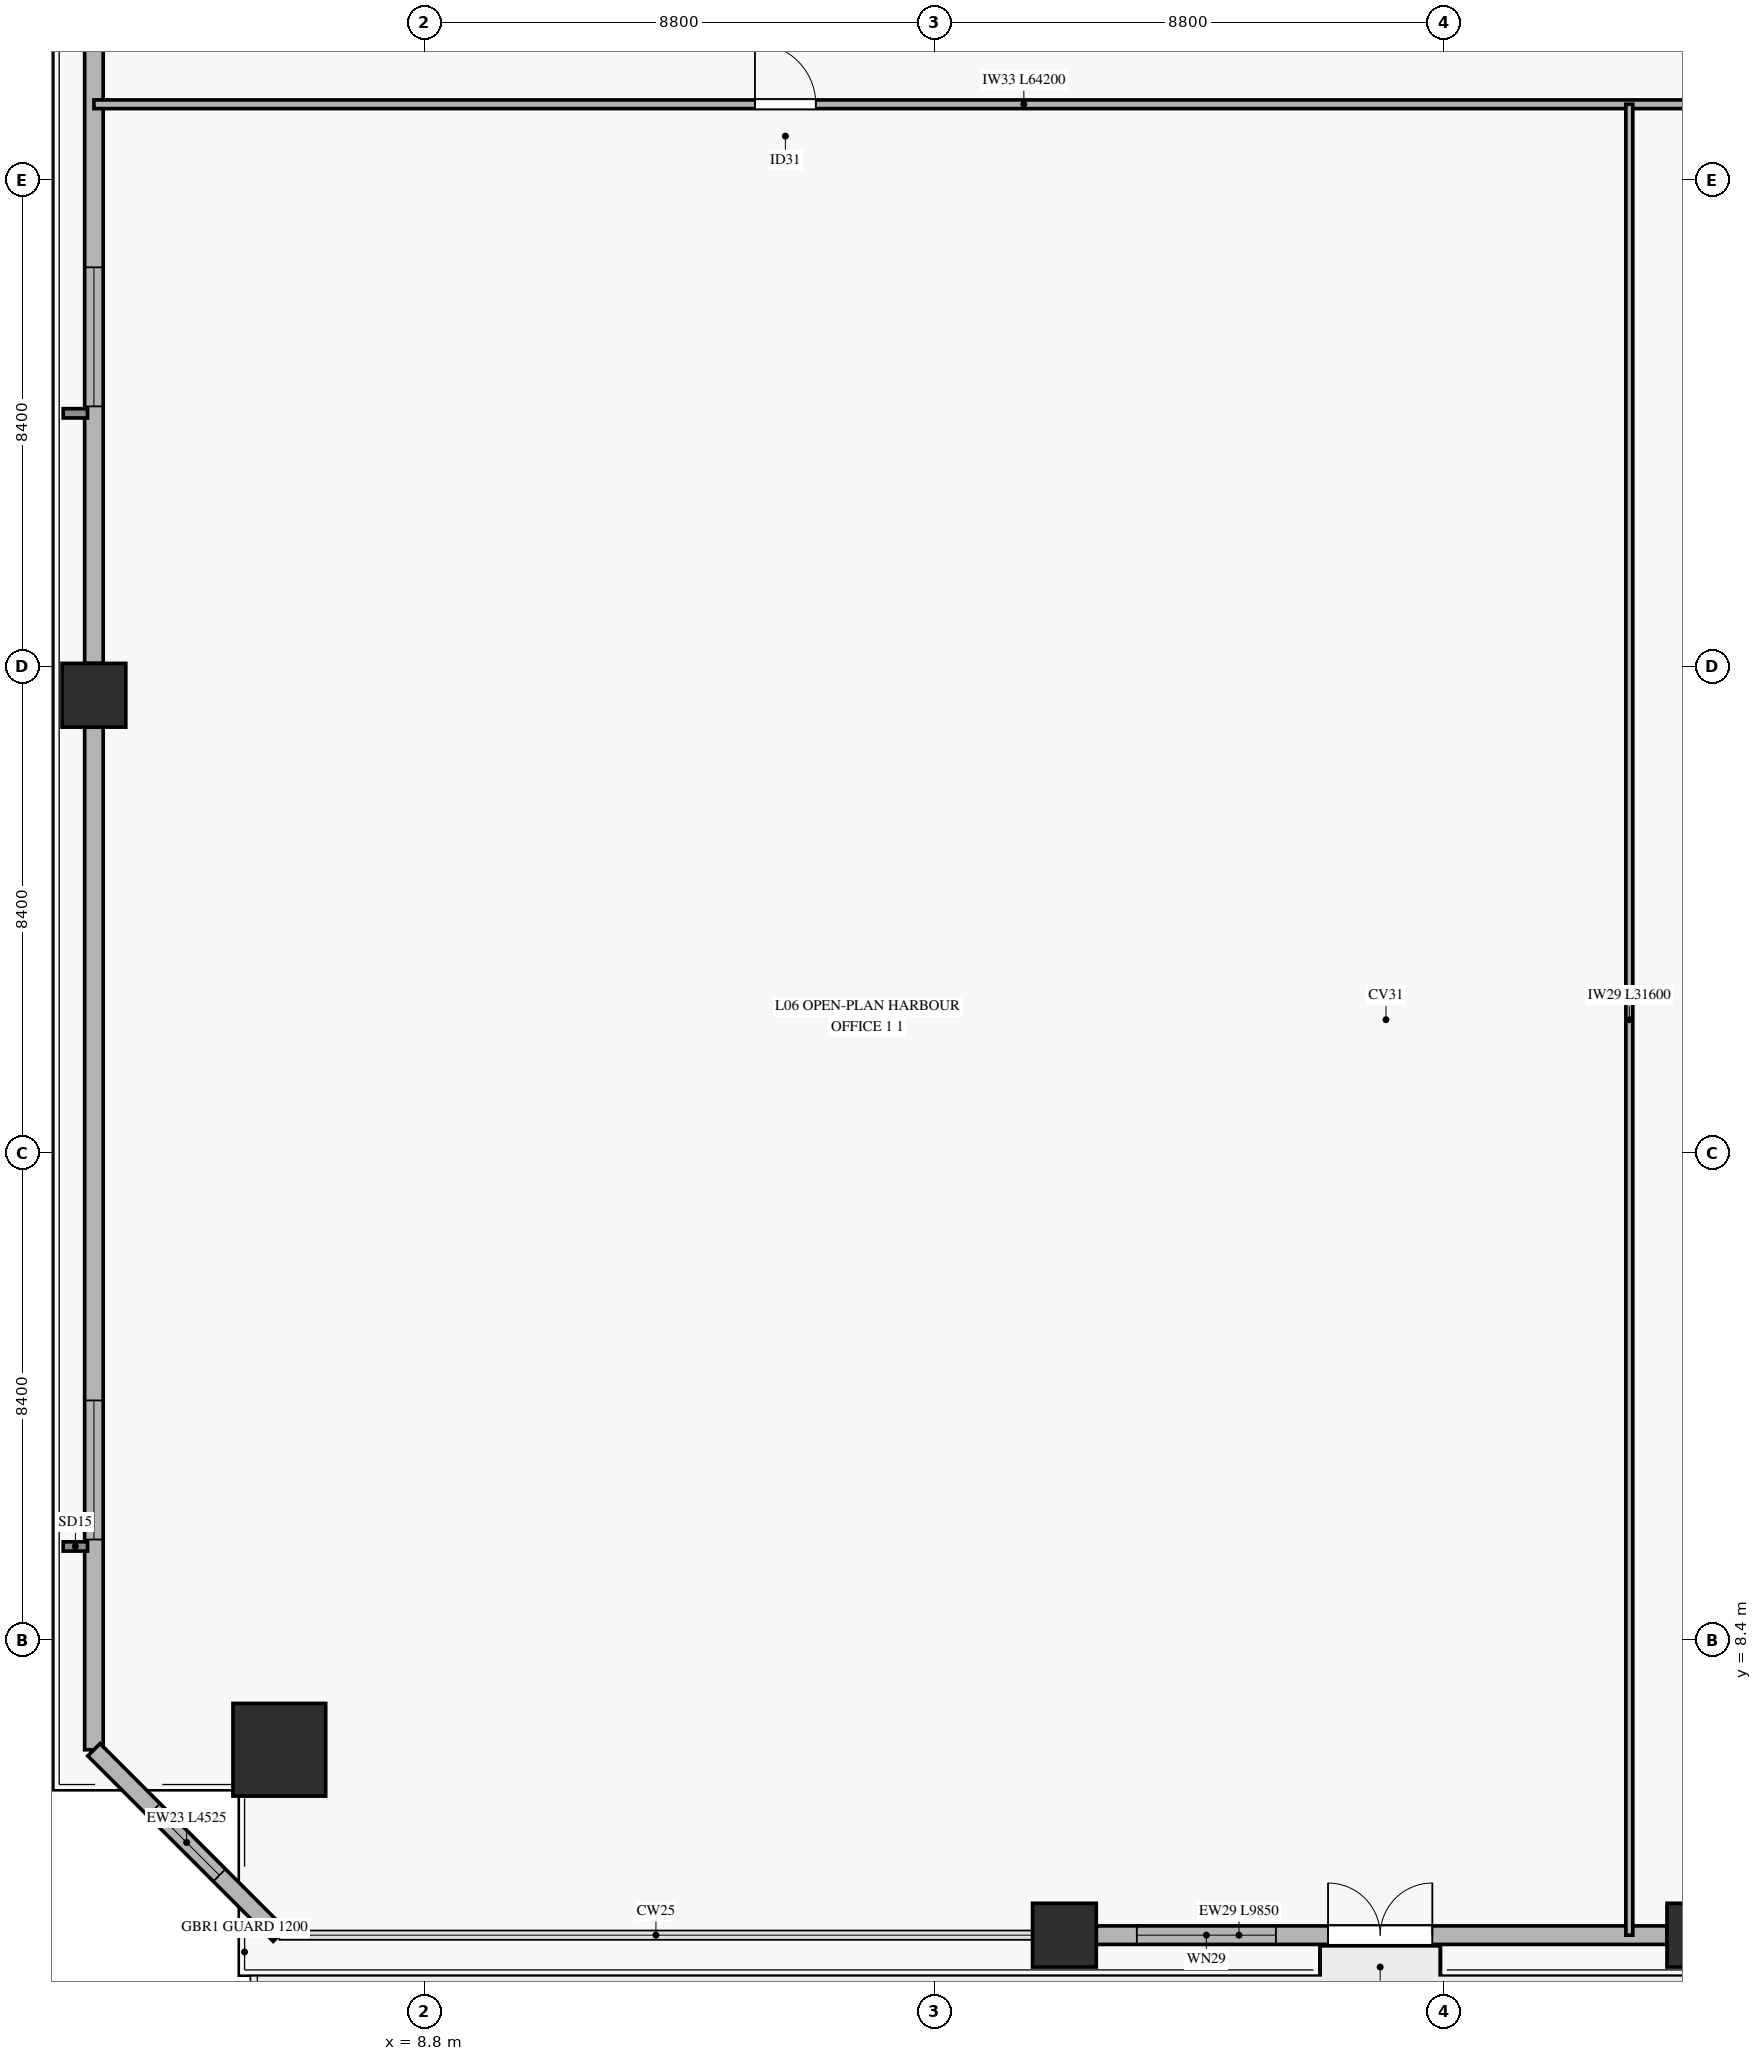
"""IFC4 building model, lengths in metres.
Left out: names, types, materials, properties, quantities, classifications, styles, units other than length and angle.
Written with IfcOpenShell. Run it as: python <this file> out.ifc"""

import sys

from ifc_helpers import new_model, si_unit, direction, frame, frame_2d, origin, origin_2d, place, context, subcontext, project, spatial, rectangle, hollow_rectangle, extrude, source, transform, mapped, element, fill, save


model = new_model("IFC4")
c1 = context("Model", 3, precision=1e-05, world=origin(), true_north=direction((0.0, 1.0)))
c2 = subcontext(c1, "Body", "Model", "MODEL_VIEW")
j1 = project(units=[si_unit("LENGTHUNIT", "METRE"), si_unit("PLANEANGLEUNIT", "RADIAN")], contexts=[c1])
p1 = place(None, origin())
s1 = spatial("IfcSite", under=j1, at=p1, CompositionType="ELEMENT")
p2 = place(p1, origin())
s2 = spatial("IfcBuilding", under=s1, at=p2, CompositionType="ELEMENT")
p3 = place(p2, frame((0.0, 0.0, 25.4)))
s3 = spatial("IfcBuildingStorey", under=s2, at=p3, CompositionType="ELEMENT", Elevation=25.4)
m1 = source(origin(), c2, "Body", "SweptSolid", [
    extrude(hollow_rectangle(XDim=1.6, YDim=1.6, WallThickness=0.075, at=origin_2d()), origin(), (0.0, 0.0, 1.0), 3.68),
])
p4 = place(p3, frame((6.3, 6.5, 0.0), z_axis=(0.0, 0.0, 1.0), x_axis=(1.0, 0.0, 0.0)))
e1 = element("IfcColumn", 1, at=p4, inside=s3, PredefinedType="COLUMN", context=c2, shape_type="MappedRepresentation", body=[
    mapped(m1, transform((0.0, 0.0, 0.0), x_axis=(1.0, 0.0, 0.0), y_axis=(0.0, 1.0, 0.0), z_axis=(0.0, 0.0, 1.0), scale=1.0)),
])
m2 = source(origin(), c2, "Body", "SweptSolid", [
    extrude(hollow_rectangle(XDim=1.1, YDim=1.1, WallThickness=0.05, at=origin_2d()), origin(), (0.0, 0.0, 1.0), 3.68),
])
for number, where, z_axis, x_axis in (
    (2, (19.85, 3.3, 0.0), (0.0, 0.0, 1.0), (1.0, 0.0, 0.0)),
    (3, (30.8, 3.3, 0.0), (0.0, 0.0, 1.0), (1.0, 0.0, 0.0)),
    (4, (3.1, 24.7, 0.0), (0.0, 0.0, 1.0), (1.0, 0.0, 0.0)),
):
    element("IfcColumn", number, at=place(p3, frame(where, z_axis=z_axis, x_axis=x_axis)), inside=s3, PredefinedType="COLUMN", context=c2, shape_type="MappedRepresentation", body=[
        mapped(m2, transform((0.0, 0.0, 0.0), x_axis=(1.0, 0.0, 0.0), y_axis=(0.0, 1.0, 0.0), z_axis=(0.0, 0.0, 1.0), scale=1.0)),
    ])
p5 = place(p3, frame((20.4, 3.3, 0.0), z_axis=(0.0, 0.0, 1.0), x_axis=(1.0, 0.0, 0.0)))
e5 = element("IfcWall", 5, at=p5, inside=s3, PredefinedType="SOLIDWALL", context=c2, shape_type="SweptSolid", body=[
    extrude(rectangle(XDim=9.85, YDim=0.32, at=frame_2d((4.925, 0.0))), origin(), (0.0, 0.0, 1.0), 3.16),
])
p6 = place(p5, frame((4.0, 0.0, 0.0)))
e6 = element("IfcOpeningElement", 6, at=p6, cuts=e5, PredefinedType="OPENING", context=c2, shape_type="SweptSolid", body=[
    extrude(rectangle(XDim=1.8, YDim=2.3, at=frame_2d((0.9, 1.15))), frame((0.0, 0.17, 0.0), z_axis=(0.0, -1.0, 0.0), x_axis=(1.0, 0.0, 0.0)), (0.0, 0.0, 1.0), 0.34),
])
p7 = place(p5, frame((0.7, 0.0, 0.45)))
e7 = element("IfcOpeningElement", 7, at=p7, cuts=e5, PredefinedType="OPENING", context=c2, shape_type="SweptSolid", body=[
    extrude(rectangle(XDim=2.4, YDim=2.1, at=frame_2d((1.2, 1.05))), frame((0.0, 0.17, 0.0), z_axis=(0.0, -1.0, 0.0), x_axis=(1.0, 0.0, 0.0)), (0.0, 0.0, 1.0), 0.34),
])
p8 = place(p3, frame((3.1, 6.5, 0.0), z_axis=(0.0, 0.0, 1.0), x_axis=(0.0, 1.0, 0.0)))
e8 = element("IfcWall", 8, at=p8, inside=s3, PredefinedType="SOLIDWALL", context=c2, shape_type="SweptSolid", body=[
    extrude(rectangle(XDim=17.65, YDim=0.32, at=frame_2d((8.825, 0.0))), origin(), (0.0, 0.0, 1.0), 3.16),
])
p9 = place(p8, frame((3.629, 0.0, 0.45)))
e9 = element("IfcOpeningElement", 9, at=p9, cuts=e8, PredefinedType="OPENING", context=c2, shape_type="SweptSolid", body=[
    extrude(rectangle(XDim=2.4, YDim=2.1, at=frame_2d((1.2, 1.05))), frame((0.0, 0.17, 0.0), z_axis=(0.0, -1.0, 0.0), x_axis=(1.0, 0.0, 0.0)), (0.0, 0.0, 1.0), 0.34),
])
p10 = place(p3, frame((3.1, 25.25, 0.0), z_axis=(0.0, 0.0, 1.0), x_axis=(0.0, 1.0, 0.0)))
e10 = element("IfcWall", 10, at=p10, inside=s3, PredefinedType="SOLIDWALL", context=c2, shape_type="SweptSolid", body=[
    extrude(rectangle(XDim=17.65, YDim=0.32, at=frame_2d((8.825, 0.0))), origin(), (0.0, 0.0, 1.0), 3.16),
])
p11 = place(p10, frame((4.436, 0.0, 0.45)))
e11 = element("IfcOpeningElement", 11, at=p11, cuts=e10, PredefinedType="OPENING", context=c2, shape_type="SweptSolid", body=[
    extrude(rectangle(XDim=2.4, YDim=2.1, at=frame_2d((1.2, 1.05))), frame((0.0, 0.17, 0.0), z_axis=(0.0, -1.0, 0.0), x_axis=(1.0, 0.0, 0.0)), (0.0, 0.0, 1.0), 0.34),
])
p12 = place(p3, frame((3.1, 6.5, 0.0), z_axis=(0.0, 0.0, 1.0), x_axis=(0.707106781187, -0.707106781187, 0.0)))
e12 = element("IfcWall", 12, at=p12, inside=s3, PredefinedType="SOLIDWALL", context=c2, shape_type="SweptSolid", body=[
    extrude(rectangle(XDim=4.525, YDim=0.3, at=frame_2d((2.263, 0.0))), origin(), (0.0, 0.0, 1.0), 3.16),
])
p13 = place(p12, frame((1.463, 0.0, 0.45)))
e13 = element("IfcOpeningElement", 13, at=p13, cuts=e12, PredefinedType="OPENING", context=c2, shape_type="SweptSolid", body=[
    extrude(rectangle(XDim=1.6, YDim=2.0, at=frame_2d((0.8, 1.0))), frame((0.0, 0.16, 0.0), z_axis=(0.0, -1.0, 0.0), x_axis=(1.0, 0.0, 0.0)), (0.0, 0.0, 1.0), 0.32),
])
p14 = place(p3, frame((3.1, 34.9, 0.0), z_axis=(0.0, 0.0, 1.0), x_axis=(1.0, 0.0, 0.0)))
e14 = element("IfcWall", 14, at=p14, inside=s3, PredefinedType="PARTITIONING", context=c2, shape_type="SweptSolid", body=[
    extrude(rectangle(XDim=64.2, YDim=0.15, at=frame_2d((32.1, 0.0))), origin(), (0.0, 0.0, 1.0), 2.765),
])
p15 = place(p14, frame((11.409, 0.0, 0.0)))
e15 = element("IfcOpeningElement", 15, at=p15, cuts=e14, PredefinedType="OPENING", context=c2, shape_type="SweptSolid", body=[
    extrude(rectangle(XDim=1.05, YDim=2.15, at=frame_2d((0.525, 1.075))), frame((0.0, 0.085, 0.0), z_axis=(0.0, -1.0, 0.0), x_axis=(1.0, 0.0, 0.0)), (0.0, 0.0, 1.0), 0.17),
])
p16 = place(p14, frame((31.787, 0.0, 0.0)))
e16 = element("IfcOpeningElement", 16, at=p16, cuts=e14, PredefinedType="OPENING", context=c2, shape_type="SweptSolid", body=[
    extrude(rectangle(XDim=1.05, YDim=2.15, at=frame_2d((0.525, 1.075))), frame((0.0, 0.085, 0.0), z_axis=(0.0, -1.0, 0.0), x_axis=(1.0, 0.0, 0.0)), (0.0, 0.0, 1.0), 0.17),
])
p17 = place(p14, frame((49.489, 0.0, 0.0)))
e17 = element("IfcOpeningElement", 17, at=p17, cuts=e14, PredefinedType="OPENING", context=c2, shape_type="SweptSolid", body=[
    extrude(rectangle(XDim=1.05, YDim=2.15, at=frame_2d((0.525, 1.075))), frame((0.0, 0.085, 0.0), z_axis=(0.0, -1.0, 0.0), x_axis=(1.0, 0.0, 0.0)), (0.0, 0.0, 1.0), 0.17),
])
p18 = place(p3, frame((29.6, 3.3, 0.0), z_axis=(0.0, 0.0, 1.0), x_axis=(0.0, 1.0, 0.0)))
e18 = element("IfcWall", 18, at=p18, inside=s3, PredefinedType="PARTITIONING", context=c2, shape_type="SweptSolid", body=[
    extrude(rectangle(XDim=31.6, YDim=0.12, at=frame_2d((15.8, 0.0))), origin(), (0.0, 0.0, 1.0), 3.165),
])
m3 = source(origin(), c2, "Body", "SweptSolid", [
    extrude(rectangle(XDim=1.8, YDim=2.3, at=frame_2d((0.9, 1.15))), frame((0.0, 0.025, 0.0), z_axis=(0.0, -1.0, 0.0), x_axis=(1.0, 0.0, 0.0)), (0.0, 0.0, 1.0), 0.05),
])
p19 = place(p6, origin())
e19 = element("IfcDoor", 19, at=p19, inside=s3, OperationType="DOUBLE_SWING_LEFT", PredefinedType="DOOR", context=c2, shape_type="MappedRepresentation", body=[
    mapped(m3, transform((0.0, 0.0, 0.0), x_axis=(1.0, 0.0, 0.0), y_axis=(0.0, 1.0, 0.0), z_axis=(0.0, 0.0, 1.0), scale=1.0)),
])
fill(e6, e19)
m4 = source(origin(), c2, "Body", "SweptSolid", [
    extrude(rectangle(XDim=2.4, YDim=2.1, at=frame_2d((1.2, 1.05))), frame((0.0, 0.03, 0.0), z_axis=(0.0, -1.0, 0.0), x_axis=(1.0, 0.0, 0.0)), (0.0, 0.0, 1.0), 0.06),
])
p20 = place(p7, origin())
e20 = element("IfcWindow", 20, at=p20, inside=s3, PartitioningType="SINGLE_PANEL", PredefinedType="WINDOW", context=c2, shape_type="MappedRepresentation", body=[
    mapped(m4, transform((0.0, 0.0, 0.0), x_axis=(1.0, 0.0, 0.0), y_axis=(0.0, 1.0, 0.0), z_axis=(0.0, 0.0, 1.0), scale=1.0)),
])
fill(e7, e20)
p21 = place(p9, origin())
e21 = element("IfcWindow", 21, at=p21, inside=s3, PartitioningType="SINGLE_PANEL", PredefinedType="WINDOW", context=c2, shape_type="MappedRepresentation", body=[
    mapped(m4, transform((0.0, 0.0, 0.0), x_axis=(1.0, 0.0, 0.0), y_axis=(0.0, 1.0, 0.0), z_axis=(0.0, 0.0, 1.0), scale=1.0)),
])
fill(e9, e21)
p22 = place(p11, origin())
e22 = element("IfcWindow", 22, at=p22, inside=s3, PartitioningType="SINGLE_PANEL", PredefinedType="WINDOW", context=c2, shape_type="MappedRepresentation", body=[
    mapped(m4, transform((0.0, 0.0, 0.0), x_axis=(1.0, 0.0, 0.0), y_axis=(0.0, 1.0, 0.0), z_axis=(0.0, 0.0, 1.0), scale=1.0)),
])
fill(e11, e22)
m5 = source(origin(), c2, "Body", "SweptSolid", [
    extrude(rectangle(XDim=1.6, YDim=2.0, at=frame_2d((0.8, 1.0))), frame((0.0, 0.03, 0.0), z_axis=(0.0, -1.0, 0.0), x_axis=(1.0, 0.0, 0.0)), (0.0, 0.0, 1.0), 0.06),
])
p23 = place(p13, origin())
e23 = element("IfcWindow", 23, at=p23, inside=s3, PartitioningType="SINGLE_PANEL", PredefinedType="WINDOW", context=c2, shape_type="MappedRepresentation", body=[
    mapped(m5, transform((0.0, 0.0, 0.0), x_axis=(1.0, 0.0, 0.0), y_axis=(0.0, 1.0, 0.0), z_axis=(0.0, 0.0, 1.0), scale=1.0)),
])
fill(e13, e23)
m6 = source(origin(), c2, "Body", "SweptSolid", [
    extrude(rectangle(XDim=1.05, YDim=2.15, at=frame_2d((0.525, 1.075))), frame((0.0, 0.025, 0.0), z_axis=(0.0, -1.0, 0.0), x_axis=(1.0, 0.0, 0.0)), (0.0, 0.0, 1.0), 0.05),
])
p24 = place(p15, origin())
e24 = element("IfcDoor", 24, at=p24, inside=s3, OperationType="SINGLE_SWING_LEFT", PredefinedType="DOOR", context=c2, shape_type="MappedRepresentation", body=[
    mapped(m6, transform((0.0, 0.0, 0.0), x_axis=(1.0, 0.0, 0.0), y_axis=(0.0, 1.0, 0.0), z_axis=(0.0, 0.0, 1.0), scale=1.0)),
])
fill(e15, e24)
save(model, sys.argv[1])
